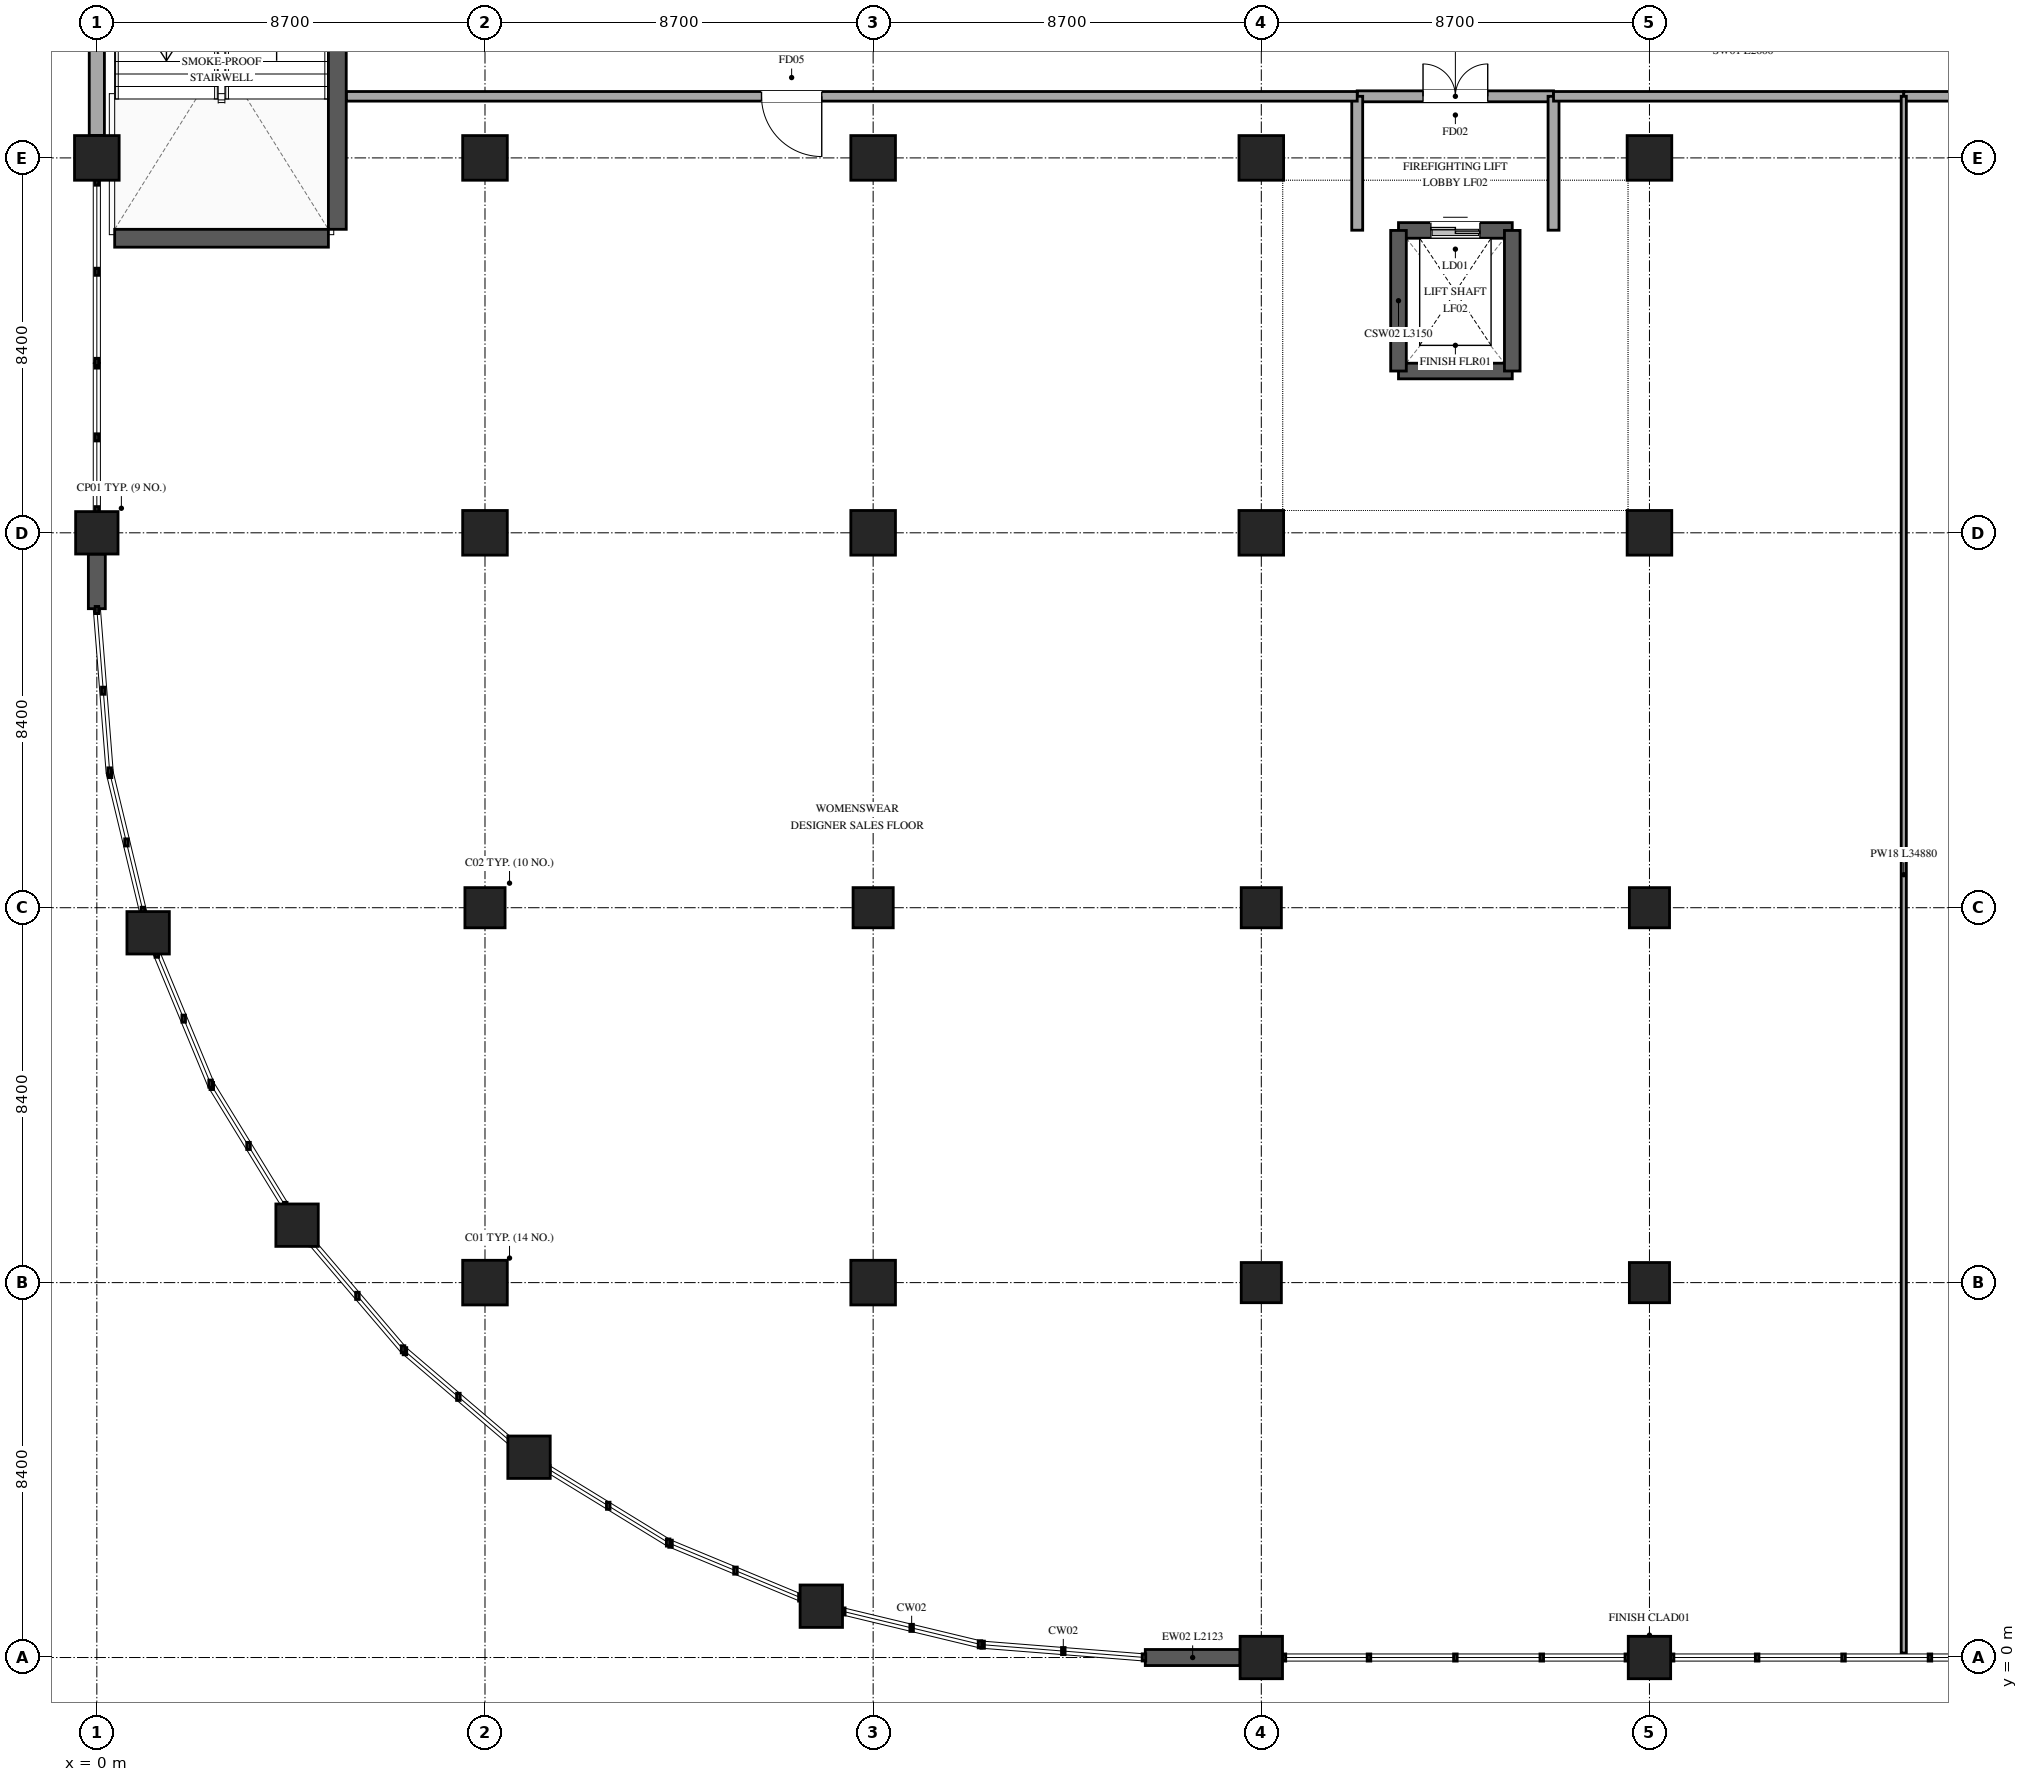
"""IFC4 building model, lengths in metres.
Left out: names, types, materials, properties, quantities, classifications, styles, units other than length and angle.
Written with IfcOpenShell. Run it as: python <this file> out.ifc"""

import sys

from ifc_helpers import new_model, si_unit, direction, frame, frame_2d, origin, origin_2d, place, context, subcontext, project, spatial, rectangle, circle, extrude, element, fill, save


model = new_model("IFC4")
c1 = context("Model", 3, precision=1e-05, world=origin(), true_north=direction((0.0, 1.0)))
c2 = subcontext(c1, "Body", "Model", "MODEL_VIEW")
j1 = project(units=[si_unit("LENGTHUNIT", "METRE"), si_unit("PLANEANGLEUNIT", "RADIAN")], contexts=[c1])
p1 = place(None, origin())
s1 = spatial("IfcSite", under=j1, at=p1, CompositionType="ELEMENT")
p2 = place(p1, origin())
s2 = spatial("IfcBuilding", under=s1, at=p2, CompositionType="ELEMENT")
p3 = place(p2, frame((0.0, 0.0, 6.0)))
s3 = spatial("IfcBuildingStorey", under=s2, at=p3, CompositionType="ELEMENT", Elevation=6.0)
p4 = place(p3, frame((0.0, 25.2, 0.0), z_axis=(0.0, 0.0, 1.0), x_axis=(1.0, 0.0, 0.0)))
e1 = element("IfcColumn", 1, at=p4, inside=s3, PredefinedType="PILASTER", context=c2, shape_type="SweptSolid", body=[
    extrude(circle(Radius=0.475, at=origin_2d()), origin(), (0.0, 0.0, 1.0), 5.4),
])
for number, where, z_axis, x_axis in (
    (2, (0.0, 33.6, 0.0), (0.0, 0.0, 1.0), (1.0, 0.0, 0.0)),
    (3, (8.7, 8.4, 0.0), (0.0, 0.0, 1.0), (1.0, 0.0, 0.0)),
):
    element("IfcColumn", number, at=place(p3, frame(where, z_axis=z_axis, x_axis=x_axis)), inside=s3, PredefinedType="COLUMN", context=c2, shape_type="SweptSolid", body=[
        extrude(rectangle(XDim=1.0, YDim=1.0, at=origin_2d()), origin(), (0.0, 0.0, 1.0), 5.4),
    ])
p5 = place(p3, frame((8.7, 16.8, 0.0), z_axis=(0.0, 0.0, 1.0), x_axis=(1.0, 0.0, 0.0)))
e4 = element("IfcColumn", 4, at=p5, inside=s3, PredefinedType="COLUMN", context=c2, shape_type="SweptSolid", body=[
    extrude(rectangle(XDim=0.9, YDim=0.9, at=origin_2d()), origin(), (0.0, 0.0, 1.0), 5.4),
])
for number, where, z_axis, x_axis in (
    (5, (8.7, 25.2, 0.0), (0.0, 0.0, 1.0), (1.0, 0.0, 0.0)),
    (6, (8.7, 33.6, 0.0), (0.0, 0.0, 1.0), (1.0, 0.0, 0.0)),
    (7, (17.4, 8.4, 0.0), (0.0, 0.0, 1.0), (1.0, 0.0, 0.0)),
):
    element("IfcColumn", number, at=place(p3, frame(where, z_axis=z_axis, x_axis=x_axis)), inside=s3, PredefinedType="COLUMN", context=c2, shape_type="SweptSolid", body=[
        extrude(rectangle(XDim=1.0, YDim=1.0, at=origin_2d()), origin(), (0.0, 0.0, 1.0), 5.4),
    ])
p6 = place(p3, frame((17.4, 16.8, 0.0), z_axis=(0.0, 0.0, 1.0), x_axis=(1.0, 0.0, 0.0)))
e8 = element("IfcColumn", 8, at=p6, inside=s3, PredefinedType="COLUMN", context=c2, shape_type="SweptSolid", body=[
    extrude(rectangle(XDim=0.9, YDim=0.9, at=origin_2d()), origin(), (0.0, 0.0, 1.0), 5.4),
])
for number, where, z_axis, x_axis in (
    (9, (17.4, 25.2, 0.0), (0.0, 0.0, 1.0), (1.0, 0.0, 0.0)),
    (10, (17.4, 33.6, 0.0), (0.0, 0.0, 1.0), (1.0, 0.0, 0.0)),
):
    element("IfcColumn", number, at=place(p3, frame(where, z_axis=z_axis, x_axis=x_axis)), inside=s3, PredefinedType="COLUMN", context=c2, shape_type="SweptSolid", body=[
        extrude(rectangle(XDim=1.0, YDim=1.0, at=origin_2d()), origin(), (0.0, 0.0, 1.0), 5.4),
    ])
p7 = place(p3, frame((26.1, 0.0, 0.0), z_axis=(0.0, 0.0, 1.0), x_axis=(1.0, 0.0, 0.0)))
e11 = element("IfcColumn", 11, at=p7, inside=s3, PredefinedType="PILASTER", context=c2, shape_type="SweptSolid", body=[
    extrude(circle(Radius=0.475, at=origin_2d()), origin(), (0.0, 0.0, 1.0), 5.4),
])
for number, where, z_axis, x_axis in (
    (12, (26.1, 8.4, 0.0), (0.0, 0.0, 1.0), (1.0, 0.0, 0.0)),
    (13, (26.1, 16.8, 0.0), (0.0, 0.0, 1.0), (1.0, 0.0, 0.0)),
):
    element("IfcColumn", number, at=place(p3, frame(where, z_axis=z_axis, x_axis=x_axis)), inside=s3, PredefinedType="COLUMN", context=c2, shape_type="SweptSolid", body=[
        extrude(rectangle(XDim=0.9, YDim=0.9, at=origin_2d()), origin(), (0.0, 0.0, 1.0), 5.4),
    ])
for number, where, z_axis, x_axis in (
    (14, (26.1, 25.2, 0.0), (0.0, 0.0, 1.0), (1.0, 0.0, 0.0)),
    (15, (26.1, 33.6, 0.0), (0.0, 0.0, 1.0), (1.0, 0.0, 0.0)),
):
    element("IfcColumn", number, at=place(p3, frame(where, z_axis=z_axis, x_axis=x_axis)), inside=s3, PredefinedType="COLUMN", context=c2, shape_type="SweptSolid", body=[
        extrude(rectangle(XDim=1.0, YDim=1.0, at=origin_2d()), origin(), (0.0, 0.0, 1.0), 5.4),
    ])
p8 = place(p3, frame((34.8, 0.0, 0.0), z_axis=(0.0, 0.0, 1.0), x_axis=(1.0, 0.0, 0.0)))
e16 = element("IfcColumn", 16, at=p8, inside=s3, PredefinedType="PILASTER", context=c2, shape_type="SweptSolid", body=[
    extrude(circle(Radius=0.475, at=origin_2d()), origin(), (0.0, 0.0, 1.0), 5.4),
])
for number, where, z_axis, x_axis in (
    (17, (34.8, 8.4, 0.0), (0.0, 0.0, 1.0), (1.0, 0.0, 0.0)),
    (18, (34.8, 16.8, 0.0), (0.0, 0.0, 1.0), (1.0, 0.0, 0.0)),
):
    element("IfcColumn", number, at=place(p3, frame(where, z_axis=z_axis, x_axis=x_axis)), inside=s3, PredefinedType="COLUMN", context=c2, shape_type="SweptSolid", body=[
        extrude(rectangle(XDim=0.9, YDim=0.9, at=origin_2d()), origin(), (0.0, 0.0, 1.0), 5.4),
    ])
for number, where, z_axis, x_axis in (
    (19, (34.8, 25.2, 0.0), (0.0, 0.0, 1.0), (1.0, 0.0, 0.0)),
    (20, (34.8, 33.6, 0.0), (0.0, 0.0, 1.0), (1.0, 0.0, 0.0)),
):
    element("IfcColumn", number, at=place(p3, frame(where, z_axis=z_axis, x_axis=x_axis)), inside=s3, PredefinedType="COLUMN", context=c2, shape_type="SweptSolid", body=[
        extrude(rectangle(XDim=1.0, YDim=1.0, at=origin_2d()), origin(), (0.0, 0.0, 1.0), 5.4),
    ])
for number, where, z_axis, x_axis in (
    (21, (1.15, 16.238, 0.0), (0.0, 0.0, 1.0), (1.0, 0.0, 0.0)),
    (22, (4.488, 9.687, 0.0), (0.0, 0.0, 1.0), (1.0, 0.0, 0.0)),
    (23, (9.687, 4.488, 0.0), (0.0, 0.0, 1.0), (1.0, 0.0, 0.0)),
    (24, (16.238, 1.15, 0.0), (0.0, 0.0, 1.0), (1.0, 0.0, 0.0)),
):
    element("IfcColumn", number, at=place(p3, frame(where, z_axis=z_axis, x_axis=x_axis)), inside=s3, PredefinedType="PILASTER", context=c2, shape_type="SweptSolid", body=[
        extrude(circle(Radius=0.475, at=origin_2d()), origin(), (0.0, 0.0, 1.0), 5.4),
    ])
p9 = place(p3, frame((25.623, 0.0, 0.0), z_axis=(0.0, 0.0, 1.0), x_axis=(-1.0, 0.0, 0.0)))
e25 = element("IfcWall", 25, at=p9, inside=s3, PredefinedType="STANDARD", context=c2, shape_type="SweptSolid", body=[
    extrude(rectangle(XDim=2.123, YDim=0.36, at=frame_2d((1.062, 0.0))), origin(), (0.0, 0.0, 1.0), 5.09),
])
p10 = place(p3, frame((0.0, 23.5, 0.0), z_axis=(0.0, 0.0, 1.0), x_axis=(0.0, 1.0, 0.0)))
e26 = element("IfcWall", 26, at=p10, inside=s3, PredefinedType="STANDARD", context=c2, shape_type="SweptSolid", body=[
    extrude(rectangle(XDim=1.223, YDim=0.38, at=frame_2d((0.611, 0.0))), origin(), (0.0, 0.0, 1.0), 5.09),
])
p11 = place(p3, frame((0.0, 34.102, 0.0), z_axis=(0.0, 0.0, 1.0), x_axis=(0.0, 1.0, 0.0)))
e27 = element("IfcWall", 27, at=p11, inside=s3, PredefinedType="STANDARD", context=c2, shape_type="SweptSolid", body=[
    extrude(rectangle(XDim=7.396, YDim=0.34, at=frame_2d((3.698, 0.0))), origin(), (0.0, 0.0, 1.0), 5.09),
])
p12 = place(p3, frame((5.39, 42.0, 0.0), z_axis=(0.0, 0.0, 1.0), x_axis=(0.0, -1.0, 0.0)))
e28 = element("IfcWall", 28, at=p12, inside=s3, PredefinedType="SHEAR", context=c2, shape_type="SweptSolid", body=[
    extrude(rectangle(XDim=10.0, YDim=0.4, at=frame_2d((5.0, 0.0))), origin(), (0.0, 0.0, 1.0), 5.4),
])
p13 = place(p12, frame((0.41, 0.0, 0.0)))
e29 = element("IfcOpeningElement", 29, at=p13, cuts=e28, PredefinedType="OPENING", context=c2, shape_type="SweptSolid", body=[
    extrude(rectangle(XDim=1.5, YDim=2.2, at=frame_2d((0.75, 1.1))), frame((0.0, 0.21, 0.0), z_axis=(0.0, -1.0, 0.0), x_axis=(1.0, 0.0, 0.0)), (0.0, 0.0, 1.0), 0.42),
])
p14 = place(p3, frame((5.19, 31.8, 0.0), z_axis=(0.0, 0.0, 1.0), x_axis=(-1.0, 0.0, 0.0)))
e30 = element("IfcWall", 30, at=p14, inside=s3, PredefinedType="SHEAR", context=c2, shape_type="SweptSolid", body=[
    extrude(rectangle(XDim=4.79, YDim=0.4, at=frame_2d((2.395, 0.0))), origin(), (0.0, 0.0, 1.0), 5.4),
])
p15 = place(p3, frame((29.175, 31.975, 0.0), z_axis=(0.0, 0.0, 1.0), x_axis=(1.0, 0.0, 0.0)))
e31 = element("IfcWall", 31, at=p15, inside=s3, PredefinedType="SHEAR", context=c2, shape_type="SweptSolid", body=[
    extrude(rectangle(XDim=2.55, YDim=0.35, at=frame_2d((1.275, 0.0))), origin(), (0.0, 0.0, 1.0), 5.4),
])
p16 = place(p15, frame((0.725, 0.0, 0.0)))
e32 = element("IfcOpeningElement", 32, at=p16, cuts=e31, PredefinedType="OPENING", context=c2, shape_type="SweptSolid", body=[
    extrude(rectangle(XDim=1.1, YDim=2.2, at=frame_2d((0.55, 1.1))), frame((0.0, 0.185, 0.0), z_axis=(0.0, -1.0, 0.0), x_axis=(1.0, 0.0, 0.0)), (0.0, 0.0, 1.0), 0.37),
])
p17 = place(p3, frame((31.725, 28.825, 0.0), z_axis=(0.0, 0.0, 1.0), x_axis=(-1.0, 0.0, 0.0)))
e33 = element("IfcWall", 33, at=p17, inside=s3, PredefinedType="SHEAR", context=c2, shape_type="SweptSolid", body=[
    extrude(rectangle(XDim=2.55, YDim=0.35, at=frame_2d((1.275, 0.0))), origin(), (0.0, 0.0, 1.0), 5.4),
])
for number, where, z_axis, x_axis in (
    (34, (29.175, 28.825, 0.0), (0.0, 0.0, 1.0), (0.0, 1.0, 0.0)),
    (35, (31.725, 31.975, 0.0), (0.0, 0.0, 1.0), (0.0, -1.0, 0.0)),
):
    element("IfcWall", number, at=place(p3, frame(where, z_axis=z_axis, x_axis=x_axis)), inside=s3, PredefinedType="SHEAR", context=c2, shape_type="SweptSolid", body=[
        extrude(rectangle(XDim=3.15, YDim=0.35, at=frame_2d((1.575, 0.0))), origin(), (0.0, 0.0, 1.0), 5.4),
    ])
p18 = place(p3, frame((28.25, 34.98, 0.0), z_axis=(0.0, 0.0, 1.0), x_axis=(1.0, 0.0, 0.0)))
e36 = element("IfcWall", 36, at=p18, inside=s3, PredefinedType="STANDARD", context=c2, shape_type="SweptSolid", body=[
    extrude(rectangle(XDim=4.4, YDim=0.245, at=frame_2d((2.2, 0.0))), origin(), (0.0, 0.0, 1.0), 5.06),
])
p19 = place(p18, frame((1.475, 0.0, 0.0)))
e37 = element("IfcOpeningElement", 37, at=p19, cuts=e36, PredefinedType="OPENING", context=c2, shape_type="SweptSolid", body=[
    extrude(rectangle(XDim=1.45, YDim=2.2, at=frame_2d((0.725, 1.1))), frame((0.0, 0.133, 0.0), z_axis=(0.0, -1.0, 0.0), x_axis=(1.0, 0.0, 0.0)), (0.0, 0.0, 1.0), 0.265),
])
for number, where, z_axis, x_axis in (
    (38, (28.25, 31.98, 0.0), (0.0, 0.0, 1.0), (0.0, 1.0, 0.0)),
    (39, (32.65, 34.98, 0.0), (0.0, 0.0, 1.0), (0.0, -1.0, 0.0)),
):
    element("IfcWall", number, at=place(p3, frame(where, z_axis=z_axis, x_axis=x_axis)), inside=s3, PredefinedType="STANDARD", context=c2, shape_type="SweptSolid", body=[
        extrude(rectangle(XDim=3.0, YDim=0.245, at=frame_2d((1.5, 0.0))), origin(), (0.0, 0.0, 1.0), 4.31),
    ])
p20 = place(p3, frame((28.25, 34.98, 0.0), z_axis=(0.0, 0.0, 1.0), x_axis=(-1.0, 0.0, 0.0)))
e40 = element("IfcWall", 40, at=p20, inside=s3, PredefinedType="PARTITIONING", context=c2, shape_type="SweptSolid", body=[
    extrude(rectangle(XDim=22.655, YDim=0.215, at=frame_2d((11.328, 0.0))), origin(), (0.0, 0.0, 1.0), 4.31),
])
p21 = place(p20, frame((12.002, 0.0, 0.0)))
e41 = element("IfcOpeningElement", 41, at=p21, cuts=e40, PredefinedType="OPENING", context=c2, shape_type="SweptSolid", body=[
    extrude(rectangle(XDim=1.35, YDim=2.2, at=frame_2d((0.675, 1.1))), frame((0.0, 0.118, 0.0), z_axis=(0.0, -1.0, 0.0), x_axis=(1.0, 0.0, 0.0)), (0.0, 0.0, 1.0), 0.235),
])
p22 = place(p3, frame((40.5, 34.98, 0.0), z_axis=(0.0, 0.0, 1.0), x_axis=(-1.0, 0.0, 0.0)))
e42 = element("IfcWall", 42, at=p22, inside=s3, PredefinedType="PARTITIONING", context=c2, shape_type="SweptSolid", body=[
    extrude(rectangle(XDim=7.85, YDim=0.215, at=frame_2d((3.925, 0.0))), origin(), (0.0, 0.0, 1.0), 4.31),
])
p23 = place(p3, frame((44.6, 34.98, 0.0), z_axis=(0.0, 0.0, 1.0), x_axis=(-1.0, 0.0, 0.0)))
e43 = element("IfcWall", 43, at=p23, inside=s3, PredefinedType="PARTITIONING", context=c2, shape_type="SweptSolid", body=[
    extrude(rectangle(XDim=4.1, YDim=0.215, at=frame_2d((2.05, 0.0))), origin(), (0.0, 0.0, 1.0), 4.31),
])
p24 = place(p3, frame((40.5, 34.98, 0.0), z_axis=(0.0, 0.0, 1.0), x_axis=(0.0, -1.0, 0.0)))
e44 = element("IfcWall", 44, at=p24, inside=s3, PredefinedType="PARTITIONING", context=c2, shape_type="SweptSolid", body=[
    extrude(rectangle(XDim=34.88, YDim=0.115, at=frame_2d((17.44, 0.0))), origin(), (0.0, 0.0, 1.0), 4.31),
])
p25 = place(p16, origin())
e45 = element("IfcDoor", 45, at=p25, inside=s3, OperationType="DOUBLE_DOOR_SLIDING", PredefinedType="DOOR", context=c2, shape_type="SweptSolid", body=[
    extrude(rectangle(XDim=1.1, YDim=2.2, at=frame_2d((0.55, 1.1))), frame((0.0, 0.025, 0.0), z_axis=(0.0, -1.0, 0.0), x_axis=(1.0, 0.0, 0.0)), (0.0, 0.0, 1.0), 0.05),
])
fill(e32, e45)
p26 = place(p19, origin())
e46 = element("IfcDoor", 46, at=p26, inside=s3, OperationType="DOUBLE_DOOR_SINGLE_SWING", PredefinedType="DOOR", context=c2, shape_type="SweptSolid", body=[
    extrude(rectangle(XDim=1.45, YDim=2.2, at=frame_2d((0.725, 1.1))), frame((0.0, 0.025, 0.0), z_axis=(0.0, -1.0, 0.0), x_axis=(1.0, 0.0, 0.0)), (0.0, 0.0, 1.0), 0.05),
])
fill(e37, e46)
p27 = place(p21, origin())
e47 = element("IfcDoor", 47, at=p27, inside=s3, OperationType="SINGLE_SWING_LEFT", PredefinedType="DOOR", context=c2, shape_type="SweptSolid", body=[
    extrude(rectangle(XDim=1.35, YDim=2.2, at=frame_2d((0.675, 1.1))), frame((0.0, 0.025, 0.0), z_axis=(0.0, -1.0, 0.0), x_axis=(1.0, 0.0, 0.0)), (0.0, 0.0, 1.0), 0.05),
])
fill(e41, e47)
save(model, sys.argv[1])
